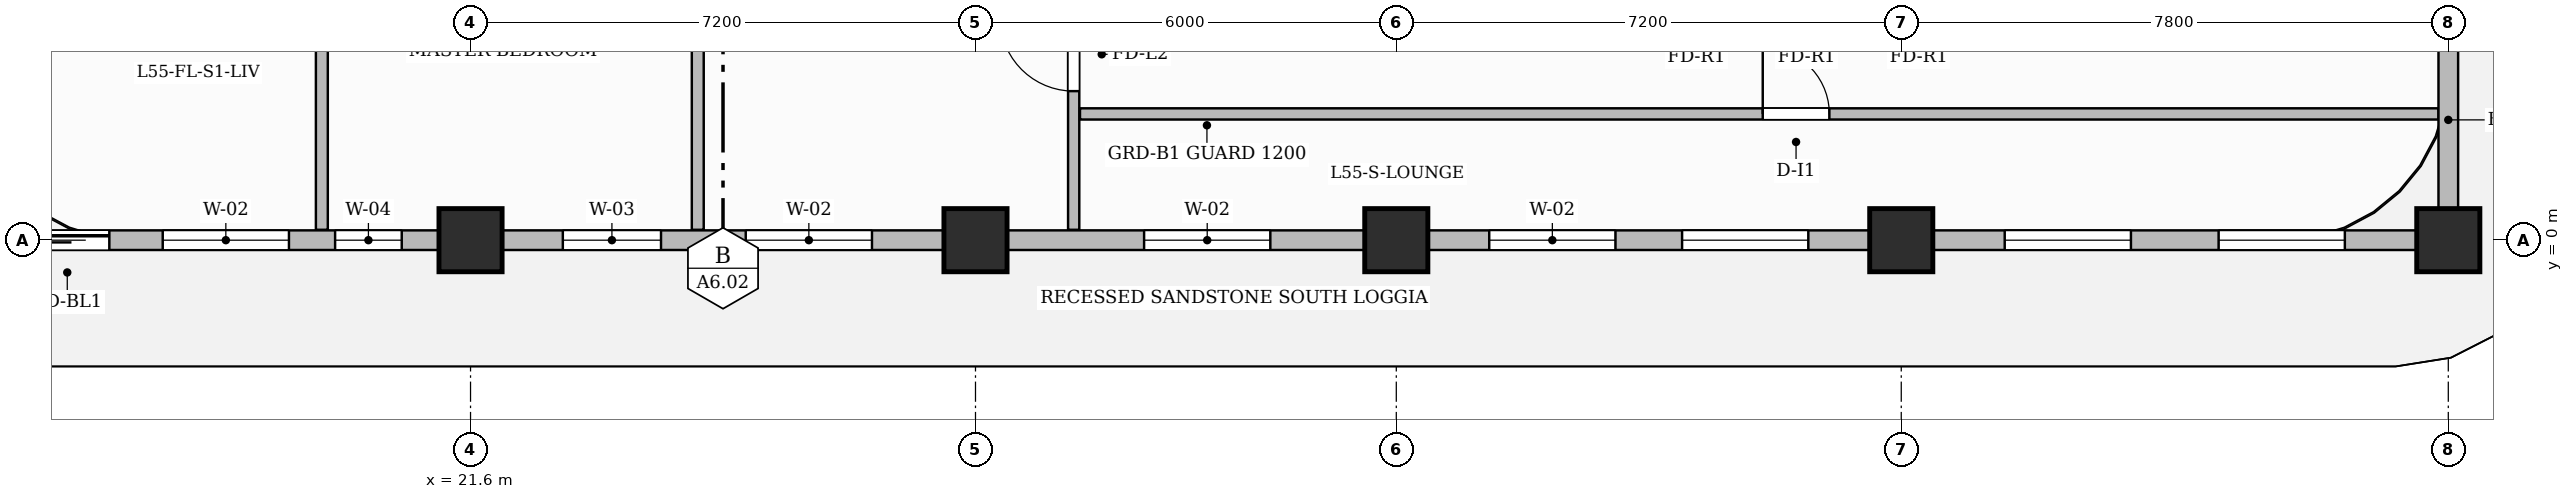
"""IFC4 building model, lengths in metres.
Left out: names, types, materials, properties, quantities, classifications, styles, units other than length and angle.
Written with IfcOpenShell. Run it as: python <this file> out.ifc"""

import sys

from ifc_helpers import new_model, si_unit, direction, frame, frame_2d, origin, origin_2d, place, context, subcontext, project, spatial, rectangle, extrude, source, transform, mapped, element, fill, save


model = new_model("IFC4")
c1 = context("Model", 3, precision=1e-05, world=origin(), true_north=direction((0.0, 1.0)))
c2 = subcontext(c1, "Body", "Model", "MODEL_VIEW")
j1 = project(units=[si_unit("LENGTHUNIT", "METRE"), si_unit("PLANEANGLEUNIT", "RADIAN")], contexts=[c1])
p1 = place(None, origin())
s1 = spatial("IfcSite", under=j1, at=p1, CompositionType="ELEMENT")
p2 = place(p1, origin())
s2 = spatial("IfcBuilding", under=s1, at=p2, CompositionType="ELEMENT")
p3 = place(p2, frame((0.0, 0.0, 221.15)))
s3 = spatial("IfcBuildingStorey", under=s2, at=p3, CompositionType="ELEMENT", Elevation=221.15)
m1 = source(origin(), c2, "Body", "SweptSolid", [
    extrude(rectangle(XDim=0.9, YDim=0.9, at=origin_2d()), origin(), (0.0, 0.0, 1.0), 3.85),
])
for number, where, z_axis, x_axis in (
    (1, (21.6, 0.0, 0.0), (0.0, 0.0, 1.0), (1.0, 0.0, 0.0)),
    (2, (28.8, 0.0, 0.0), (0.0, 0.0, 1.0), (1.0, 0.0, 0.0)),
    (3, (34.8, 0.0, 0.0), (0.0, 0.0, 1.0), (1.0, 0.0, 0.0)),
    (4, (42.0, 0.0, 0.0), (0.0, 0.0, 1.0), (1.0, 0.0, 0.0)),
    (5, (49.8, 0.0, 0.0), (0.0, 0.0, 1.0), (1.0, 0.0, 0.0)),
):
    element("IfcColumn", number, at=place(p3, frame(where, z_axis=z_axis, x_axis=x_axis)), inside=s3, PredefinedType="COLUMN", context=c2, shape_type="MappedRepresentation", body=[
        mapped(m1, transform((0.0, 0.0, 0.0), scale=1.0)),
    ])
p4 = place(p3, frame((30.2, 0.148, 0.0), z_axis=(0.0, 0.0, 1.0), x_axis=(0.0, 1.0, 0.0)))
e6 = element("IfcWall", 6, at=p4, inside=s3, PredefinedType="PARTITIONING", context=c2, shape_type="SweptSolid", body=[
    extrude(rectangle(XDim=8.912, YDim=0.16, at=frame_2d((4.456, 0.0))), origin(), (0.0, 0.0, 1.0), 3.6),
])
p5 = place(p4, frame((1.977, 0.0, 0.0)))
e7 = element("IfcOpeningElement", 7, at=p5, cuts=e6, PredefinedType="OPENING", context=c2, shape_type="SweptSolid", body=[
    extrude(rectangle(XDim=1.05, YDim=2.15, at=frame_2d((0.525, 1.075))), frame((0.0, 0.09, 0.0), z_axis=(0.0, -1.0, 0.0), x_axis=(1.0, 0.0, 0.0)), (0.0, 0.0, 1.0), 0.18),
])
p6 = place(p3, frame((30.29, 1.8, 0.0), z_axis=(0.0, 0.0, 1.0), x_axis=(1.0, 0.0, 0.0)))
e8 = element("IfcWall", 8, at=p6, inside=s3, PredefinedType="PARTITIONING", context=c2, shape_type="SweptSolid", body=[
    extrude(rectangle(XDim=19.37, YDim=0.16, at=frame_2d((9.685, 0.0))), origin(), (0.0, 0.0, 1.0), 3.6),
])
p7 = place(p6, frame((9.735, 0.0, 0.0)))
e9 = element("IfcOpeningElement", 9, at=p7, cuts=e8, PredefinedType="OPENING", context=c2, shape_type="SweptSolid", body=[
    extrude(rectangle(XDim=0.95, YDim=2.15, at=frame_2d((0.475, 1.075))), frame((0.0, 0.09, 0.0), z_axis=(0.0, -1.0, 0.0), x_axis=(1.0, 0.0, 0.0)), (0.0, 0.0, 1.0), 0.18),
])
p8 = place(p3, frame((19.48, 0.148, 0.0), z_axis=(0.0, 0.0, 1.0), x_axis=(0.0, 1.0, 0.0)))
e10 = element("IfcWall", 10, at=p8, inside=s3, PredefinedType="PARTITIONING", context=c2, shape_type="SweptSolid", body=[
    extrude(rectangle(XDim=8.912, YDim=0.17, at=frame_2d((4.456, 0.0))), origin(), (0.0, 0.0, 1.0), 3.6),
])
p9 = place(p8, frame((7.452, 0.0, 0.0)))
e11 = element("IfcOpeningElement", 11, at=p9, cuts=e10, PredefinedType="OPENING", context=c2, shape_type="SweptSolid", body=[
    extrude(rectangle(XDim=0.95, YDim=2.15, at=frame_2d((0.475, 1.075))), frame((0.0, 0.095, 0.0), z_axis=(0.0, -1.0, 0.0), x_axis=(1.0, 0.0, 0.0)), (0.0, 0.0, 1.0), 0.19),
])
p10 = place(p3, frame((24.84, 0.148, 0.0), z_axis=(0.0, 0.0, 1.0), x_axis=(0.0, 1.0, 0.0)))
e12 = element("IfcWall", 12, at=p10, inside=s3, PredefinedType="PARTITIONING", context=c2, shape_type="SweptSolid", body=[
    extrude(rectangle(XDim=6.762, YDim=0.17, at=frame_2d((3.381, 0.0))), origin(), (0.0, 0.0, 1.0), 3.6),
])
p11 = place(p3, frame((14.4, 0.0, 0.0), z_axis=(0.0, 0.0, 1.0), x_axis=(1.0, 0.0, 0.0)))
e13 = element("IfcWall", 13, at=p11, inside=s3, PredefinedType="SOLIDWALL", context=c2, shape_type="SweptSolid", body=[
    extrude(rectangle(XDim=35.4, YDim=0.28, at=frame_2d((17.7, 0.0))), origin(), (0.0, 0.0, 1.0), 3.135),
])
p12 = place(p11, frame((0.85, 0.0, 0.0)))
e14 = element("IfcOpeningElement", 14, at=p12, cuts=e13, PredefinedType="OPENING", context=c2, shape_type="SweptSolid", body=[
    extrude(rectangle(XDim=1.2, YDim=2.2, at=frame_2d((0.6, 1.1))), frame((0.0, 0.15, 0.0), z_axis=(0.0, -1.0, 0.0), x_axis=(1.0, 0.0, 0.0)), (0.0, 0.0, 1.0), 0.3),
])
p13 = place(p11, frame((2.811, 0.0, 0.8)))
e15 = element("IfcOpeningElement", 15, at=p13, cuts=e13, PredefinedType="OPENING", context=c2, shape_type="SweptSolid", body=[
    extrude(rectangle(XDim=1.8, YDim=1.85, at=frame_2d((0.9, 0.925))), frame((0.0, 0.15, 0.0), z_axis=(0.0, -1.0, 0.0), x_axis=(1.0, 0.0, 0.0)), (0.0, 0.0, 1.0), 0.3),
])
p14 = place(p11, frame((5.269, 0.0, 0.8)))
e16 = element("IfcOpeningElement", 16, at=p14, cuts=e13, PredefinedType="OPENING", context=c2, shape_type="SweptSolid", body=[
    extrude(rectangle(XDim=0.95, YDim=1.75, at=frame_2d((0.475, 0.875))), frame((0.0, 0.15, 0.0), z_axis=(0.0, -1.0, 0.0), x_axis=(1.0, 0.0, 0.0)), (0.0, 0.0, 1.0), 0.3),
])
p15 = place(p11, frame((8.516, 0.0, 0.8)))
e17 = element("IfcOpeningElement", 17, at=p15, cuts=e13, PredefinedType="OPENING", context=c2, shape_type="SweptSolid", body=[
    extrude(rectangle(XDim=1.4, YDim=1.85, at=frame_2d((0.7, 0.925))), frame((0.0, 0.15, 0.0), z_axis=(0.0, -1.0, 0.0), x_axis=(1.0, 0.0, 0.0)), (0.0, 0.0, 1.0), 0.3),
])
p16 = place(p11, frame((11.124, 0.0, 0.8)))
e18 = element("IfcOpeningElement", 18, at=p16, cuts=e13, PredefinedType="OPENING", context=c2, shape_type="SweptSolid", body=[
    extrude(rectangle(XDim=1.8, YDim=1.85, at=frame_2d((0.9, 0.925))), frame((0.0, 0.15, 0.0), z_axis=(0.0, -1.0, 0.0), x_axis=(1.0, 0.0, 0.0)), (0.0, 0.0, 1.0), 0.3),
])
p17 = place(p11, frame((16.804, 0.0, 0.8)))
e19 = element("IfcOpeningElement", 19, at=p17, cuts=e13, PredefinedType="OPENING", context=c2, shape_type="SweptSolid", body=[
    extrude(rectangle(XDim=1.8, YDim=1.85, at=frame_2d((0.9, 0.925))), frame((0.0, 0.15, 0.0), z_axis=(0.0, -1.0, 0.0), x_axis=(1.0, 0.0, 0.0)), (0.0, 0.0, 1.0), 0.3),
])
p18 = place(p11, frame((21.725, 0.0, 0.8)))
e20 = element("IfcOpeningElement", 20, at=p18, cuts=e13, PredefinedType="OPENING", context=c2, shape_type="SweptSolid", body=[
    extrude(rectangle(XDim=1.8, YDim=1.85, at=frame_2d((0.9, 0.925))), frame((0.0, 0.15, 0.0), z_axis=(0.0, -1.0, 0.0), x_axis=(1.0, 0.0, 0.0)), (0.0, 0.0, 1.0), 0.3),
])
p19 = place(p11, frame((24.475, 0.0, 0.8)))
e21 = element("IfcOpeningElement", 21, at=p19, cuts=e13, PredefinedType="OPENING", context=c2, shape_type="SweptSolid", body=[
    extrude(rectangle(XDim=1.8, YDim=1.85, at=frame_2d((0.9, 0.925))), frame((0.0, 0.15, 0.0), z_axis=(0.0, -1.0, 0.0), x_axis=(1.0, 0.0, 0.0)), (0.0, 0.0, 1.0), 0.3),
])
p20 = place(p11, frame((29.075, 0.0, 0.8)))
e22 = element("IfcOpeningElement", 22, at=p20, cuts=e13, PredefinedType="OPENING", context=c2, shape_type="SweptSolid", body=[
    extrude(rectangle(XDim=1.8, YDim=1.85, at=frame_2d((0.9, 0.925))), frame((0.0, 0.15, 0.0), z_axis=(0.0, -1.0, 0.0), x_axis=(1.0, 0.0, 0.0)), (0.0, 0.0, 1.0), 0.3),
])
p21 = place(p11, frame((32.125, 0.0, 0.8)))
e23 = element("IfcOpeningElement", 23, at=p21, cuts=e13, PredefinedType="OPENING", context=c2, shape_type="SweptSolid", body=[
    extrude(rectangle(XDim=1.8, YDim=1.85, at=frame_2d((0.9, 0.925))), frame((0.0, 0.15, 0.0), z_axis=(0.0, -1.0, 0.0), x_axis=(1.0, 0.0, 0.0)), (0.0, 0.0, 1.0), 0.3),
])
p22 = place(p3, frame((49.8, 0.05, 0.0), z_axis=(0.0, 0.0, 1.0), x_axis=(0.0, 1.0, 0.0)))
e24 = element("IfcWall", 24, at=p22, inside=s3, PredefinedType="SOLIDWALL", context=c2, shape_type="SweptSolid", body=[
    extrude(rectangle(XDim=3.33, YDim=0.28, at=frame_2d((1.665, 0.0))), origin(), (0.0, 0.0, 1.0), 3.6),
])
m2 = source(origin(), c2, "Body", "SweptSolid", [
    extrude(rectangle(XDim=1.05, YDim=2.15, at=frame_2d((0.525, 1.075))), frame((0.0, 0.025, 0.0), z_axis=(0.0, -1.0, 0.0), x_axis=(1.0, 0.0, 0.0)), (0.0, 0.0, 1.0), 0.05),
])
p23 = place(p5, origin())
e25 = element("IfcDoor", 25, at=p23, inside=s3, OperationType="SINGLE_SWING_RIGHT", PredefinedType="DOOR", context=c2, shape_type="MappedRepresentation", body=[
    mapped(m2, transform((0.0, 0.0, 0.0), scale=1.0)),
])
fill(e7, e25)
m3 = source(origin(), c2, "Body", "SweptSolid", [
    extrude(rectangle(XDim=0.95, YDim=2.15, at=frame_2d((0.475, 1.075))), frame((0.0, 0.025, 0.0), z_axis=(0.0, -1.0, 0.0), x_axis=(1.0, 0.0, 0.0)), (0.0, 0.0, 1.0), 0.05),
])
p24 = place(p7, origin())
e26 = element("IfcDoor", 26, at=p24, inside=s3, OperationType="SINGLE_SWING_LEFT", PredefinedType="DOOR", context=c2, shape_type="MappedRepresentation", body=[
    mapped(m3, transform((0.0, 0.0, 0.0), scale=1.0)),
])
fill(e9, e26)
m4 = source(origin(), c2, "Body", "SweptSolid", [
    extrude(rectangle(XDim=1.2, YDim=2.2, at=frame_2d((0.6, 1.1))), frame((0.0, 0.025, 0.0), z_axis=(0.0, -1.0, 0.0), x_axis=(1.0, 0.0, 0.0)), (0.0, 0.0, 1.0), 0.05),
])
p25 = place(p12, origin())
e27 = element("IfcDoor", 27, at=p25, inside=s3, OperationType="SLIDING_TO_LEFT", PredefinedType="DOOR", context=c2, shape_type="MappedRepresentation", body=[
    mapped(m4, transform((0.0, 0.0, 0.0), scale=1.0)),
])
fill(e14, e27)
m5 = source(origin(), c2, "Body", "SweptSolid", [
    extrude(rectangle(XDim=1.8, YDim=1.85, at=frame_2d((0.9, 0.925))), frame((0.0, 0.03, 0.0), z_axis=(0.0, -1.0, 0.0), x_axis=(1.0, 0.0, 0.0)), (0.0, 0.0, 1.0), 0.06),
])
p26 = place(p13, origin())
e28 = element("IfcWindow", 28, at=p26, inside=s3, PartitioningType="DOUBLE_PANEL_VERTICAL", PredefinedType="WINDOW", context=c2, shape_type="MappedRepresentation", body=[
    mapped(m5, transform((0.0, 0.0, 0.0), scale=1.0)),
])
fill(e15, e28)
m6 = source(origin(), c2, "Body", "SweptSolid", [
    extrude(rectangle(XDim=0.95, YDim=1.75, at=frame_2d((0.475, 0.875))), frame((0.0, 0.03, 0.0), z_axis=(0.0, -1.0, 0.0), x_axis=(1.0, 0.0, 0.0)), (0.0, 0.0, 1.0), 0.06),
])
p27 = place(p14, origin())
e29 = element("IfcWindow", 29, at=p27, inside=s3, PartitioningType="SINGLE_PANEL", PredefinedType="WINDOW", context=c2, shape_type="MappedRepresentation", body=[
    mapped(m6, transform((0.0, 0.0, 0.0), scale=1.0)),
])
fill(e16, e29)
m7 = source(origin(), c2, "Body", "SweptSolid", [
    extrude(rectangle(XDim=1.4, YDim=1.85, at=frame_2d((0.7, 0.925))), frame((0.0, 0.03, 0.0), z_axis=(0.0, -1.0, 0.0), x_axis=(1.0, 0.0, 0.0)), (0.0, 0.0, 1.0), 0.06),
])
p28 = place(p15, origin())
e30 = element("IfcWindow", 30, at=p28, inside=s3, PartitioningType="SINGLE_PANEL", PredefinedType="WINDOW", context=c2, shape_type="MappedRepresentation", body=[
    mapped(m7, transform((0.0, 0.0, 0.0), scale=1.0)),
])
fill(e17, e30)
p29 = place(p16, origin())
e31 = element("IfcWindow", 31, at=p29, inside=s3, PartitioningType="DOUBLE_PANEL_VERTICAL", PredefinedType="WINDOW", context=c2, shape_type="MappedRepresentation", body=[
    mapped(m5, transform((0.0, 0.0, 0.0), scale=1.0)),
])
fill(e18, e31)
p30 = place(p17, origin())
e32 = element("IfcWindow", 32, at=p30, inside=s3, PartitioningType="DOUBLE_PANEL_VERTICAL", PredefinedType="WINDOW", context=c2, shape_type="MappedRepresentation", body=[
    mapped(m5, transform((0.0, 0.0, 0.0), scale=1.0)),
])
fill(e19, e32)
p31 = place(p18, origin())
e33 = element("IfcWindow", 33, at=p31, inside=s3, PartitioningType="DOUBLE_PANEL_VERTICAL", PredefinedType="WINDOW", context=c2, shape_type="MappedRepresentation", body=[
    mapped(m5, transform((0.0, 0.0, 0.0), scale=1.0)),
])
fill(e20, e33)
p32 = place(p19, origin())
e34 = element("IfcWindow", 34, at=p32, inside=s3, PartitioningType="DOUBLE_PANEL_VERTICAL", PredefinedType="WINDOW", context=c2, shape_type="MappedRepresentation", body=[
    mapped(m5, transform((0.0, 0.0, 0.0), scale=1.0)),
])
fill(e21, e34)
p33 = place(p20, origin())
e35 = element("IfcWindow", 35, at=p33, inside=s3, PartitioningType="DOUBLE_PANEL_VERTICAL", PredefinedType="WINDOW", context=c2, shape_type="MappedRepresentation", body=[
    mapped(m5, transform((0.0, 0.0, 0.0), scale=1.0)),
])
fill(e22, e35)
p34 = place(p21, origin())
e36 = element("IfcWindow", 36, at=p34, inside=s3, PartitioningType="DOUBLE_PANEL_VERTICAL", PredefinedType="WINDOW", context=c2, shape_type="MappedRepresentation", body=[
    mapped(m5, transform((0.0, 0.0, 0.0), scale=1.0)),
])
fill(e23, e36)
save(model, sys.argv[1])
